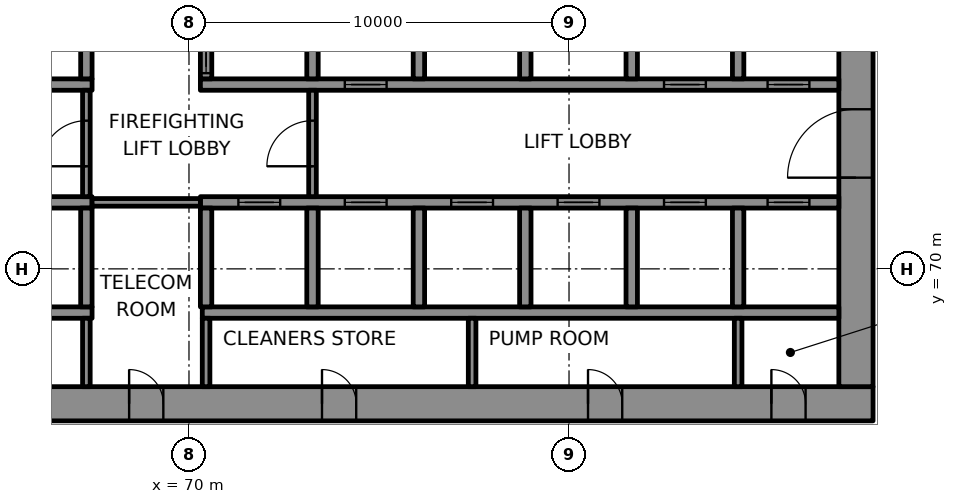
"""IFC4 building model, lengths in metres.
Left out: names, types, materials, properties, quantities, classifications, styles, units other than length and angle.
Written with IfcOpenShell. Run it as: python <this file> out.ifc"""

import sys

from ifc_helpers import new_model, si_unit, direction, frame, frame_2d, origin, place, context, subcontext, project, spatial, rectangle, extrude, element, fill, save


model = new_model("IFC4")
c1 = context("Model", 3, precision=1e-05, world=origin(), true_north=direction((0.0, 1.0)))
c2 = subcontext(c1, "Body", "Model", "MODEL_VIEW")
j1 = project(units=[si_unit("LENGTHUNIT", "METRE"), si_unit("PLANEANGLEUNIT", "RADIAN")], contexts=[c1])
p1 = place(None, origin())
s1 = spatial("IfcSite", under=j1, at=p1, CompositionType="ELEMENT")
p2 = place(p1, origin())
s2 = spatial("IfcBuilding", under=s1, at=p2, CompositionType="ELEMENT")
p3 = place(p2, frame((0.0, 0.0, 94.6)))
s3 = spatial("IfcBuildingStorey", under=s2, at=p3, CompositionType="ELEMENT", Elevation=94.6)
p4 = place(p3, frame((62.0, 66.45, 0.0), z_axis=(0.0, 0.0, 1.0), x_axis=(1.0, 0.0, 0.0)))
e1 = element("IfcWall", 1, at=p4, inside=s3, PredefinedType="SHEAR", context=c2, shape_type="SweptSolid", body=[
    extrude(rectangle(XDim=26.0, YDim=0.9, at=frame_2d((13.0, 0.0))), origin(), (0.0, 0.0, 1.0), 4.0),
])
p5 = place(p4, frame((3.45, 0.0, 0.0)))
e2 = element("IfcOpeningElement", 2, at=p5, cuts=e1, PredefinedType="OPENING", context=c2, shape_type="SweptSolid", body=[
    extrude(rectangle(XDim=0.9, YDim=2.1, at=frame_2d((0.45, 1.05))), frame((0.0, 0.46, 0.0), z_axis=(0.0, -1.0, 0.0), x_axis=(1.0, 0.0, 0.0)), (0.0, 0.0, 1.0), 0.92),
])
p6 = place(p4, frame((6.425, 0.0, 0.0)))
e3 = element("IfcOpeningElement", 3, at=p6, cuts=e1, PredefinedType="OPENING", context=c2, shape_type="SweptSolid", body=[
    extrude(rectangle(XDim=0.9, YDim=2.1, at=frame_2d((0.45, 1.05))), frame((0.0, 0.46, 0.0), z_axis=(0.0, -1.0, 0.0), x_axis=(1.0, 0.0, 0.0)), (0.0, 0.0, 1.0), 0.92),
])
p7 = place(p4, frame((11.5, 0.0, 0.0)))
e4 = element("IfcOpeningElement", 4, at=p7, cuts=e1, PredefinedType="OPENING", context=c2, shape_type="SweptSolid", body=[
    extrude(rectangle(XDim=0.9, YDim=2.1, at=frame_2d((0.45, 1.05))), frame((0.0, 0.46, 0.0), z_axis=(0.0, -1.0, 0.0), x_axis=(1.0, 0.0, 0.0)), (0.0, 0.0, 1.0), 0.92),
])
p8 = place(p4, frame((18.5, 0.0, 0.0)))
e5 = element("IfcOpeningElement", 5, at=p8, cuts=e1, PredefinedType="OPENING", context=c2, shape_type="SweptSolid", body=[
    extrude(rectangle(XDim=0.9, YDim=2.1, at=frame_2d((0.45, 1.05))), frame((0.0, 0.46, 0.0), z_axis=(0.0, -1.0, 0.0), x_axis=(1.0, 0.0, 0.0)), (0.0, 0.0, 1.0), 0.92),
])
p9 = place(p4, frame((23.325, 0.0, 0.0)))
e6 = element("IfcOpeningElement", 6, at=p9, cuts=e1, PredefinedType="OPENING", context=c2, shape_type="SweptSolid", body=[
    extrude(rectangle(XDim=0.9, YDim=2.1, at=frame_2d((0.45, 1.05))), frame((0.0, 0.46, 0.0), z_axis=(0.0, -1.0, 0.0), x_axis=(1.0, 0.0, 0.0)), (0.0, 0.0, 1.0), 0.92),
])
p10 = place(p3, frame((87.55, 66.9, 0.0), z_axis=(0.0, 0.0, 1.0), x_axis=(0.0, 1.0, 0.0)))
e7 = element("IfcWall", 7, at=p10, inside=s3, PredefinedType="SHEAR", context=c2, shape_type="SweptSolid", body=[
    extrude(rectangle(XDim=16.2, YDim=0.9, at=frame_2d((8.1, 0.0))), origin(), (0.0, 0.0, 1.0), 4.0),
])
p11 = place(p10, frame((5.5, 0.0, 0.0)))
e8 = element("IfcOpeningElement", 8, at=p11, cuts=e7, PredefinedType="OPENING", context=c2, shape_type="SweptSolid", body=[
    extrude(rectangle(XDim=1.8, YDim=2.1, at=frame_2d((0.9, 1.05))), frame((0.0, 0.46, 0.0), z_axis=(0.0, -1.0, 0.0), x_axis=(1.0, 0.0, 0.0)), (0.0, 0.0, 1.0), 0.92),
])
p12 = place(p10, frame((12.272, 0.0, 0.0)))
e9 = element("IfcOpeningElement", 9, at=p12, cuts=e7, PredefinedType="OPENING", context=c2, shape_type="SweptSolid", body=[
    extrude(rectangle(XDim=0.9, YDim=2.1, at=frame_2d((0.45, 1.05))), frame((0.0, 0.46, 0.0), z_axis=(0.0, -1.0, 0.0), x_axis=(1.0, 0.0, 0.0)), (0.0, 0.0, 1.0), 0.92),
])
p13 = place(p3, frame((64.35, 68.85, 0.0), z_axis=(0.0, 0.0, 1.0), x_axis=(1.0, 0.0, 0.0)))
e10 = element("IfcWall", 10, at=p13, inside=s3, PredefinedType="SHEAR", context=c2, shape_type="SweptSolid", body=[
    extrude(rectangle(XDim=3.1, YDim=0.3, at=frame_2d((1.55, 0.0))), origin(), (0.0, 0.0, 1.0), 4.0),
])
p14 = place(p3, frame((70.35, 68.85, 0.0), z_axis=(0.0, 0.0, 1.0), x_axis=(1.0, 0.0, 0.0)))
e11 = element("IfcWall", 11, at=p14, inside=s3, PredefinedType="SHEAR", context=c2, shape_type="SweptSolid", body=[
    extrude(rectangle(XDim=16.75, YDim=0.3, at=frame_2d((8.375, 0.0))), origin(), (0.0, 0.0, 1.0), 4.0),
])
p15 = place(p3, frame((64.35, 71.75, 0.0), z_axis=(0.0, 0.0, 1.0), x_axis=(1.0, 0.0, 0.0)))
e12 = element("IfcWall", 12, at=p15, inside=s3, PredefinedType="SHEAR", context=c2, shape_type="SweptSolid", body=[
    extrude(rectangle(XDim=3.1, YDim=0.3, at=frame_2d((1.55, 0.0))), origin(), (0.0, 0.0, 1.0), 4.0),
])
p16 = place(p3, frame((70.3, 71.75, 0.0), z_axis=(0.0, 0.0, 1.0), x_axis=(1.0, 0.0, 0.0)))
e13 = element("IfcWall", 13, at=p16, inside=s3, PredefinedType="SHEAR", context=c2, shape_type="SweptSolid", body=[
    extrude(rectangle(XDim=16.8, YDim=0.3, at=frame_2d((8.4, 0.0))), origin(), (0.0, 0.0, 1.0), 4.0),
])
p17 = place(p16, frame((1.0, 0.0, 0.0)))
e14 = element("IfcOpeningElement", 14, at=p17, cuts=e13, PredefinedType="OPENING", context=c2, shape_type="SweptSolid", body=[
    extrude(rectangle(XDim=1.1, YDim=2.1, at=frame_2d((0.55, 1.05))), frame((0.0, 0.16, 0.0), z_axis=(0.0, -1.0, 0.0), x_axis=(1.0, 0.0, 0.0)), (0.0, 0.0, 1.0), 0.32),
])
p18 = place(p16, frame((3.8, 0.0, 0.0)))
e15 = element("IfcOpeningElement", 15, at=p18, cuts=e13, PredefinedType="OPENING", context=c2, shape_type="SweptSolid", body=[
    extrude(rectangle(XDim=1.1, YDim=2.1, at=frame_2d((0.55, 1.05))), frame((0.0, 0.16, 0.0), z_axis=(0.0, -1.0, 0.0), x_axis=(1.0, 0.0, 0.0)), (0.0, 0.0, 1.0), 0.32),
])
p19 = place(p16, frame((6.6, 0.0, 0.0)))
e16 = element("IfcOpeningElement", 16, at=p19, cuts=e13, PredefinedType="OPENING", context=c2, shape_type="SweptSolid", body=[
    extrude(rectangle(XDim=1.1, YDim=2.1, at=frame_2d((0.55, 1.05))), frame((0.0, 0.16, 0.0), z_axis=(0.0, -1.0, 0.0), x_axis=(1.0, 0.0, 0.0)), (0.0, 0.0, 1.0), 0.32),
])
p20 = place(p16, frame((9.4, 0.0, 0.0)))
e17 = element("IfcOpeningElement", 17, at=p20, cuts=e13, PredefinedType="OPENING", context=c2, shape_type="SweptSolid", body=[
    extrude(rectangle(XDim=1.1, YDim=2.1, at=frame_2d((0.55, 1.05))), frame((0.0, 0.16, 0.0), z_axis=(0.0, -1.0, 0.0), x_axis=(1.0, 0.0, 0.0)), (0.0, 0.0, 1.0), 0.32),
])
p21 = place(p16, frame((12.2, 0.0, 0.0)))
e18 = element("IfcOpeningElement", 18, at=p21, cuts=e13, PredefinedType="OPENING", context=c2, shape_type="SweptSolid", body=[
    extrude(rectangle(XDim=1.1, YDim=2.1, at=frame_2d((0.55, 1.05))), frame((0.0, 0.16, 0.0), z_axis=(0.0, -1.0, 0.0), x_axis=(1.0, 0.0, 0.0)), (0.0, 0.0, 1.0), 0.32),
])
p22 = place(p16, frame((14.925, 0.0, 0.0)))
e19 = element("IfcOpeningElement", 19, at=p22, cuts=e13, PredefinedType="OPENING", context=c2, shape_type="SweptSolid", body=[
    extrude(rectangle(XDim=1.1, YDim=2.1, at=frame_2d((0.55, 1.05))), frame((0.0, 0.16, 0.0), z_axis=(0.0, -1.0, 0.0), x_axis=(1.0, 0.0, 0.0)), (0.0, 0.0, 1.0), 0.32),
])
p23 = place(p3, frame((64.35, 74.85, 0.0), z_axis=(0.0, 0.0, 1.0), x_axis=(1.0, 0.0, 0.0)))
e20 = element("IfcWall", 20, at=p23, inside=s3, PredefinedType="SHEAR", context=c2, shape_type="SweptSolid", body=[
    extrude(rectangle(XDim=3.1, YDim=0.3, at=frame_2d((1.55, 0.0))), origin(), (0.0, 0.0, 1.0), 4.0),
])
p24 = place(p3, frame((70.3, 74.85, 0.0), z_axis=(0.0, 0.0, 1.0), x_axis=(1.0, 0.0, 0.0)))
e21 = element("IfcWall", 21, at=p24, inside=s3, PredefinedType="SHEAR", context=c2, shape_type="SweptSolid", body=[
    extrude(rectangle(XDim=16.8, YDim=0.3, at=frame_2d((8.4, 0.0))), origin(), (0.0, 0.0, 1.0), 4.0),
])
p25 = place(p24, frame((3.8, 0.0, 0.0)))
e22 = element("IfcOpeningElement", 22, at=p25, cuts=e21, PredefinedType="OPENING", context=c2, shape_type="SweptSolid", body=[
    extrude(rectangle(XDim=1.1, YDim=2.1, at=frame_2d((0.55, 1.05))), frame((0.0, 0.16, 0.0), z_axis=(0.0, -1.0, 0.0), x_axis=(1.0, 0.0, 0.0)), (0.0, 0.0, 1.0), 0.32),
])
p26 = place(p24, frame((12.2, 0.0, 0.0)))
e23 = element("IfcOpeningElement", 23, at=p26, cuts=e21, PredefinedType="OPENING", context=c2, shape_type="SweptSolid", body=[
    extrude(rectangle(XDim=1.1, YDim=2.1, at=frame_2d((0.55, 1.05))), frame((0.0, 0.16, 0.0), z_axis=(0.0, -1.0, 0.0), x_axis=(1.0, 0.0, 0.0)), (0.0, 0.0, 1.0), 0.32),
])
p27 = place(p24, frame((14.925, 0.0, 0.0)))
e24 = element("IfcOpeningElement", 24, at=p27, cuts=e21, PredefinedType="OPENING", context=c2, shape_type="SweptSolid", body=[
    extrude(rectangle(XDim=1.1, YDim=2.1, at=frame_2d((0.55, 1.05))), frame((0.0, 0.16, 0.0), z_axis=(0.0, -1.0, 0.0), x_axis=(1.0, 0.0, 0.0)), (0.0, 0.0, 1.0), 0.32),
])
for number, where, z_axis, x_axis in (
    (25, (67.3, 69.0, 0.0), (0.0, 0.0, 1.0), (0.0, 1.0, 0.0)),
    (26, (67.3, 75.0, 0.0), (0.0, 0.0, 1.0), (0.0, 1.0, 0.0)),
    (27, (70.45, 69.0, 0.0), (0.0, 0.0, 1.0), (0.0, 1.0, 0.0)),
):
    element("IfcWall", number, at=place(p3, frame(where, z_axis=z_axis, x_axis=x_axis)), inside=s3, PredefinedType="SHEAR", context=c2, shape_type="SweptSolid", body=[
        extrude(rectangle(XDim=2.6, YDim=0.3, at=frame_2d((1.3, 0.0))), origin(), (0.0, 0.0, 1.0), 4.0),
    ])
p28 = place(p3, frame((70.45, 75.0, 0.0), z_axis=(0.0, 0.0, 1.0), x_axis=(0.0, 1.0, 0.0)))
e28 = element("IfcWall", 28, at=p28, inside=s3, PredefinedType="SHEAR", context=c2, shape_type="SweptSolid", body=[
    extrude(rectangle(XDim=2.6, YDim=0.3, at=frame_2d((1.3, 0.0))), origin(), (0.0, 0.0, 1.0), 4.0),
])
p29 = place(p28, frame((0.15, 0.0, 0.0)))
e29 = element("IfcOpeningElement", 29, at=p29, cuts=e28, PredefinedType="OPENING", context=c2, shape_type="SweptSolid", body=[
    extrude(rectangle(XDim=1.1, YDim=2.1, at=frame_2d((0.55, 1.05))), frame((0.0, 0.16, 0.0), z_axis=(0.0, -1.0, 0.0), x_axis=(1.0, 0.0, 0.0)), (0.0, 0.0, 1.0), 0.32),
])
for number, where, z_axis, x_axis in (
    (30, (73.25, 69.0, 0.0), (0.0, 0.0, 1.0), (0.0, 1.0, 0.0)),
    (31, (73.25, 75.0, 0.0), (0.0, 0.0, 1.0), (0.0, 1.0, 0.0)),
    (32, (76.05, 69.0, 0.0), (0.0, 0.0, 1.0), (0.0, 1.0, 0.0)),
    (33, (76.05, 75.0, 0.0), (0.0, 0.0, 1.0), (0.0, 1.0, 0.0)),
    (34, (78.85, 69.0, 0.0), (0.0, 0.0, 1.0), (0.0, 1.0, 0.0)),
    (35, (78.85, 75.0, 0.0), (0.0, 0.0, 1.0), (0.0, 1.0, 0.0)),
    (36, (81.65, 69.0, 0.0), (0.0, 0.0, 1.0), (0.0, 1.0, 0.0)),
    (37, (81.65, 75.0, 0.0), (0.0, 0.0, 1.0), (0.0, 1.0, 0.0)),
    (38, (84.45, 69.0, 0.0), (0.0, 0.0, 1.0), (0.0, 1.0, 0.0)),
    (39, (84.45, 75.0, 0.0), (0.0, 0.0, 1.0), (0.0, 1.0, 0.0)),
):
    element("IfcWall", number, at=place(p3, frame(where, z_axis=z_axis, x_axis=x_axis)), inside=s3, PredefinedType="SHEAR", context=c2, shape_type="SweptSolid", body=[
        extrude(rectangle(XDim=2.6, YDim=0.3, at=frame_2d((1.3, 0.0))), origin(), (0.0, 0.0, 1.0), 4.0),
    ])
p30 = place(p3, frame((67.45, 71.75, 0.0), z_axis=(0.0, 0.0, 1.0), x_axis=(1.0, 0.0, 0.0)))
e40 = element("IfcWall", 40, at=p30, inside=s3, PredefinedType="PARTITIONING", context=c2, shape_type="SweptSolid", body=[
    extrude(rectangle(XDim=2.85, YDim=0.2, at=frame_2d((1.425, 0.0))), origin(), (0.0, 0.0, 1.0), 4.0),
])
p31 = place(p3, frame((67.3, 66.9, 0.0), z_axis=(0.0, 0.0, 1.0), x_axis=(0.0, 1.0, 0.0)))
e41 = element("IfcWall", 41, at=p31, inside=s3, PredefinedType="PARTITIONING", context=c2, shape_type="SweptSolid", body=[
    extrude(rectangle(XDim=1.8, YDim=0.2, at=frame_2d((0.9, 0.0))), origin(), (0.0, 0.0, 1.0), 4.0),
])
p32 = place(p3, frame((67.3, 71.9, 0.0), z_axis=(0.0, 0.0, 1.0), x_axis=(0.0, 1.0, 0.0)))
e42 = element("IfcWall", 42, at=p32, inside=s3, PredefinedType="PARTITIONING", context=c2, shape_type="SweptSolid", body=[
    extrude(rectangle(XDim=2.8, YDim=0.2, at=frame_2d((1.4, 0.0))), origin(), (0.0, 0.0, 1.0), 4.0),
])
p33 = place(p32, frame((0.8, 0.0, 0.0)))
e43 = element("IfcOpeningElement", 43, at=p33, cuts=e42, PredefinedType="OPENING", context=c2, shape_type="SweptSolid", body=[
    extrude(rectangle(XDim=1.2, YDim=2.1, at=frame_2d((0.6, 1.05))), frame((0.0, 0.11, 0.0), z_axis=(0.0, -1.0, 0.0), x_axis=(1.0, 0.0, 0.0)), (0.0, 0.0, 1.0), 0.22),
])
p34 = place(p3, frame((70.45, 66.9, 0.0), z_axis=(0.0, 0.0, 1.0), x_axis=(0.0, 1.0, 0.0)))
e44 = element("IfcWall", 44, at=p34, inside=s3, PredefinedType="PARTITIONING", context=c2, shape_type="SweptSolid", body=[
    extrude(rectangle(XDim=1.8, YDim=0.2, at=frame_2d((0.9, 0.0))), origin(), (0.0, 0.0, 1.0), 4.0),
])
p35 = place(p3, frame((73.25, 71.9, 0.0), z_axis=(0.0, 0.0, 1.0), x_axis=(0.0, 1.0, 0.0)))
e45 = element("IfcWall", 45, at=p35, inside=s3, PredefinedType="PARTITIONING", context=c2, shape_type="SweptSolid", body=[
    extrude(rectangle(XDim=2.8, YDim=0.2, at=frame_2d((1.4, 0.0))), origin(), (0.0, 0.0, 1.0), 4.0),
])
p36 = place(p35, frame((0.8, 0.0, 0.0)))
e46 = element("IfcOpeningElement", 46, at=p36, cuts=e45, PredefinedType="OPENING", context=c2, shape_type="SweptSolid", body=[
    extrude(rectangle(XDim=1.2, YDim=2.1, at=frame_2d((0.6, 1.05))), frame((0.0, 0.11, 0.0), z_axis=(0.0, -1.0, 0.0), x_axis=(1.0, 0.0, 0.0)), (0.0, 0.0, 1.0), 0.22),
])
for number, where, z_axis, x_axis in (
    (47, (77.45, 66.9, 0.0), (0.0, 0.0, 1.0), (0.0, 1.0, 0.0)),
    (48, (84.45, 66.9, 0.0), (0.0, 0.0, 1.0), (0.0, 1.0, 0.0)),
):
    element("IfcWall", number, at=place(p3, frame(where, z_axis=z_axis, x_axis=x_axis)), inside=s3, PredefinedType="PARTITIONING", context=c2, shape_type="SweptSolid", body=[
        extrude(rectangle(XDim=1.8, YDim=0.2, at=frame_2d((0.9, 0.0))), origin(), (0.0, 0.0, 1.0), 4.0),
    ])
p37 = place(p17, origin())
e49 = element("IfcDoor", 49, at=p37, inside=s3, OperationType="DOUBLE_DOOR_SLIDING", PredefinedType="DOOR", context=c2, shape_type="SweptSolid", body=[
    extrude(rectangle(XDim=1.1, YDim=2.1, at=frame_2d((0.55, 1.05))), frame((0.0, 0.025, 0.0), z_axis=(0.0, -1.0, 0.0), x_axis=(1.0, 0.0, 0.0)), (0.0, 0.0, 1.0), 0.05),
])
fill(e14, e49)
p38 = place(p18, origin())
e50 = element("IfcDoor", 50, at=p38, inside=s3, OperationType="DOUBLE_DOOR_SLIDING", PredefinedType="DOOR", context=c2, shape_type="SweptSolid", body=[
    extrude(rectangle(XDim=1.1, YDim=2.1, at=frame_2d((0.55, 1.05))), frame((0.0, 0.025, 0.0), z_axis=(0.0, -1.0, 0.0), x_axis=(1.0, 0.0, 0.0)), (0.0, 0.0, 1.0), 0.05),
])
fill(e15, e50)
p39 = place(p19, origin())
e51 = element("IfcDoor", 51, at=p39, inside=s3, OperationType="DOUBLE_DOOR_SLIDING", PredefinedType="DOOR", context=c2, shape_type="SweptSolid", body=[
    extrude(rectangle(XDim=1.1, YDim=2.1, at=frame_2d((0.55, 1.05))), frame((0.0, 0.025, 0.0), z_axis=(0.0, -1.0, 0.0), x_axis=(1.0, 0.0, 0.0)), (0.0, 0.0, 1.0), 0.05),
])
fill(e16, e51)
p40 = place(p20, origin())
e52 = element("IfcDoor", 52, at=p40, inside=s3, OperationType="DOUBLE_DOOR_SLIDING", PredefinedType="DOOR", context=c2, shape_type="SweptSolid", body=[
    extrude(rectangle(XDim=1.1, YDim=2.1, at=frame_2d((0.55, 1.05))), frame((0.0, 0.025, 0.0), z_axis=(0.0, -1.0, 0.0), x_axis=(1.0, 0.0, 0.0)), (0.0, 0.0, 1.0), 0.05),
])
fill(e17, e52)
p41 = place(p21, origin())
e53 = element("IfcDoor", 53, at=p41, inside=s3, OperationType="DOUBLE_DOOR_SLIDING", PredefinedType="DOOR", context=c2, shape_type="SweptSolid", body=[
    extrude(rectangle(XDim=1.1, YDim=2.1, at=frame_2d((0.55, 1.05))), frame((0.0, 0.025, 0.0), z_axis=(0.0, -1.0, 0.0), x_axis=(1.0, 0.0, 0.0)), (0.0, 0.0, 1.0), 0.05),
])
fill(e18, e53)
p42 = place(p22, origin())
e54 = element("IfcDoor", 54, at=p42, inside=s3, OperationType="DOUBLE_DOOR_SLIDING", PredefinedType="DOOR", context=c2, shape_type="SweptSolid", body=[
    extrude(rectangle(XDim=1.1, YDim=2.1, at=frame_2d((0.55, 1.05))), frame((0.0, 0.025, 0.0), z_axis=(0.0, -1.0, 0.0), x_axis=(1.0, 0.0, 0.0)), (0.0, 0.0, 1.0), 0.05),
])
fill(e19, e54)
p43 = place(p29, origin())
e55 = element("IfcDoor", 55, at=p43, inside=s3, OperationType="DOUBLE_DOOR_SLIDING", PredefinedType="DOOR", context=c2, shape_type="SweptSolid", body=[
    extrude(rectangle(XDim=1.1, YDim=2.1, at=frame_2d((0.55, 1.05))), frame((0.0, 0.025, 0.0), z_axis=(0.0, -1.0, 0.0), x_axis=(1.0, 0.0, 0.0)), (0.0, 0.0, 1.0), 0.05),
])
fill(e29, e55)
p44 = place(p25, origin())
e56 = element("IfcDoor", 56, at=p44, inside=s3, OperationType="DOUBLE_DOOR_SLIDING", PredefinedType="DOOR", context=c2, shape_type="SweptSolid", body=[
    extrude(rectangle(XDim=1.1, YDim=2.1, at=frame_2d((0.55, 1.05))), frame((0.0, 0.025, 0.0), z_axis=(0.0, -1.0, 0.0), x_axis=(1.0, 0.0, 0.0)), (0.0, 0.0, 1.0), 0.05),
])
fill(e22, e56)
p45 = place(p26, origin())
e57 = element("IfcDoor", 57, at=p45, inside=s3, OperationType="DOUBLE_DOOR_SLIDING", PredefinedType="DOOR", context=c2, shape_type="SweptSolid", body=[
    extrude(rectangle(XDim=1.1, YDim=2.1, at=frame_2d((0.55, 1.05))), frame((0.0, 0.025, 0.0), z_axis=(0.0, -1.0, 0.0), x_axis=(1.0, 0.0, 0.0)), (0.0, 0.0, 1.0), 0.05),
])
fill(e23, e57)
p46 = place(p27, origin())
e58 = element("IfcDoor", 58, at=p46, inside=s3, OperationType="DOUBLE_DOOR_SLIDING", PredefinedType="DOOR", context=c2, shape_type="SweptSolid", body=[
    extrude(rectangle(XDim=1.1, YDim=2.1, at=frame_2d((0.55, 1.05))), frame((0.0, 0.025, 0.0), z_axis=(0.0, -1.0, 0.0), x_axis=(1.0, 0.0, 0.0)), (0.0, 0.0, 1.0), 0.05),
])
fill(e24, e58)
p47 = place(p36, origin())
e59 = element("IfcDoor", 59, at=p47, inside=s3, OperationType="SINGLE_SWING_LEFT", PredefinedType="DOOR", context=c2, shape_type="SweptSolid", body=[
    extrude(rectangle(XDim=1.2, YDim=2.1, at=frame_2d((0.6, 1.05))), frame((0.0, 0.025, 0.0), z_axis=(0.0, -1.0, 0.0), x_axis=(1.0, 0.0, 0.0)), (0.0, 0.0, 1.0), 0.05),
])
fill(e46, e59)
p48 = place(p33, origin())
e60 = element("IfcDoor", 60, at=p48, inside=s3, OperationType="SINGLE_SWING_RIGHT", PredefinedType="DOOR", context=c2, shape_type="SweptSolid", body=[
    extrude(rectangle(XDim=1.2, YDim=2.1, at=frame_2d((0.6, 1.05))), frame((0.0, 0.025, 0.0), z_axis=(0.0, -1.0, 0.0), x_axis=(1.0, 0.0, 0.0)), (0.0, 0.0, 1.0), 0.05),
])
fill(e43, e60)
p49 = place(p11, origin())
e61 = element("IfcDoor", 61, at=p49, inside=s3, OperationType="SINGLE_SWING_RIGHT", PredefinedType="DOOR", context=c2, shape_type="SweptSolid", body=[
    extrude(rectangle(XDim=1.8, YDim=2.1, at=frame_2d((0.9, 1.05))), frame((0.0, 0.17, 0.0), z_axis=(0.0, -1.0, 0.0), x_axis=(1.0, 0.0, 0.0)), (0.0, 0.0, 1.0), 0.34),
])
fill(e8, e61)
p50 = place(p6, origin())
e62 = element("IfcDoor", 62, at=p50, inside=s3, OperationType="SINGLE_SWING_RIGHT", PredefinedType="DOOR", context=c2, shape_type="SweptSolid", body=[
    extrude(rectangle(XDim=0.9, YDim=2.1, at=frame_2d((0.45, 1.05))), frame((0.0, 0.17, 0.0), z_axis=(0.0, -1.0, 0.0), x_axis=(1.0, 0.0, 0.0)), (0.0, 0.0, 1.0), 0.34),
])
fill(e3, e62)
p51 = place(p7, origin())
e63 = element("IfcDoor", 63, at=p51, inside=s3, OperationType="SINGLE_SWING_LEFT", PredefinedType="DOOR", context=c2, shape_type="SweptSolid", body=[
    extrude(rectangle(XDim=0.9, YDim=2.1, at=frame_2d((0.45, 1.05))), frame((0.0, 0.17, 0.0), z_axis=(0.0, -1.0, 0.0), x_axis=(1.0, 0.0, 0.0)), (0.0, 0.0, 1.0), 0.34),
])
fill(e4, e63)
p52 = place(p8, origin())
e64 = element("IfcDoor", 64, at=p52, inside=s3, OperationType="SINGLE_SWING_RIGHT", PredefinedType="DOOR", context=c2, shape_type="SweptSolid", body=[
    extrude(rectangle(XDim=0.9, YDim=2.1, at=frame_2d((0.45, 1.05))), frame((0.0, 0.17, 0.0), z_axis=(0.0, -1.0, 0.0), x_axis=(1.0, 0.0, 0.0)), (0.0, 0.0, 1.0), 0.34),
])
fill(e5, e64)
p53 = place(p9, origin())
e65 = element("IfcDoor", 65, at=p53, inside=s3, OperationType="SINGLE_SWING_LEFT", PredefinedType="DOOR", context=c2, shape_type="SweptSolid", body=[
    extrude(rectangle(XDim=0.9, YDim=2.1, at=frame_2d((0.45, 1.05))), frame((0.0, 0.17, 0.0), z_axis=(0.0, -1.0, 0.0), x_axis=(1.0, 0.0, 0.0)), (0.0, 0.0, 1.0), 0.34),
])
fill(e6, e65)
save(model, sys.argv[1])
